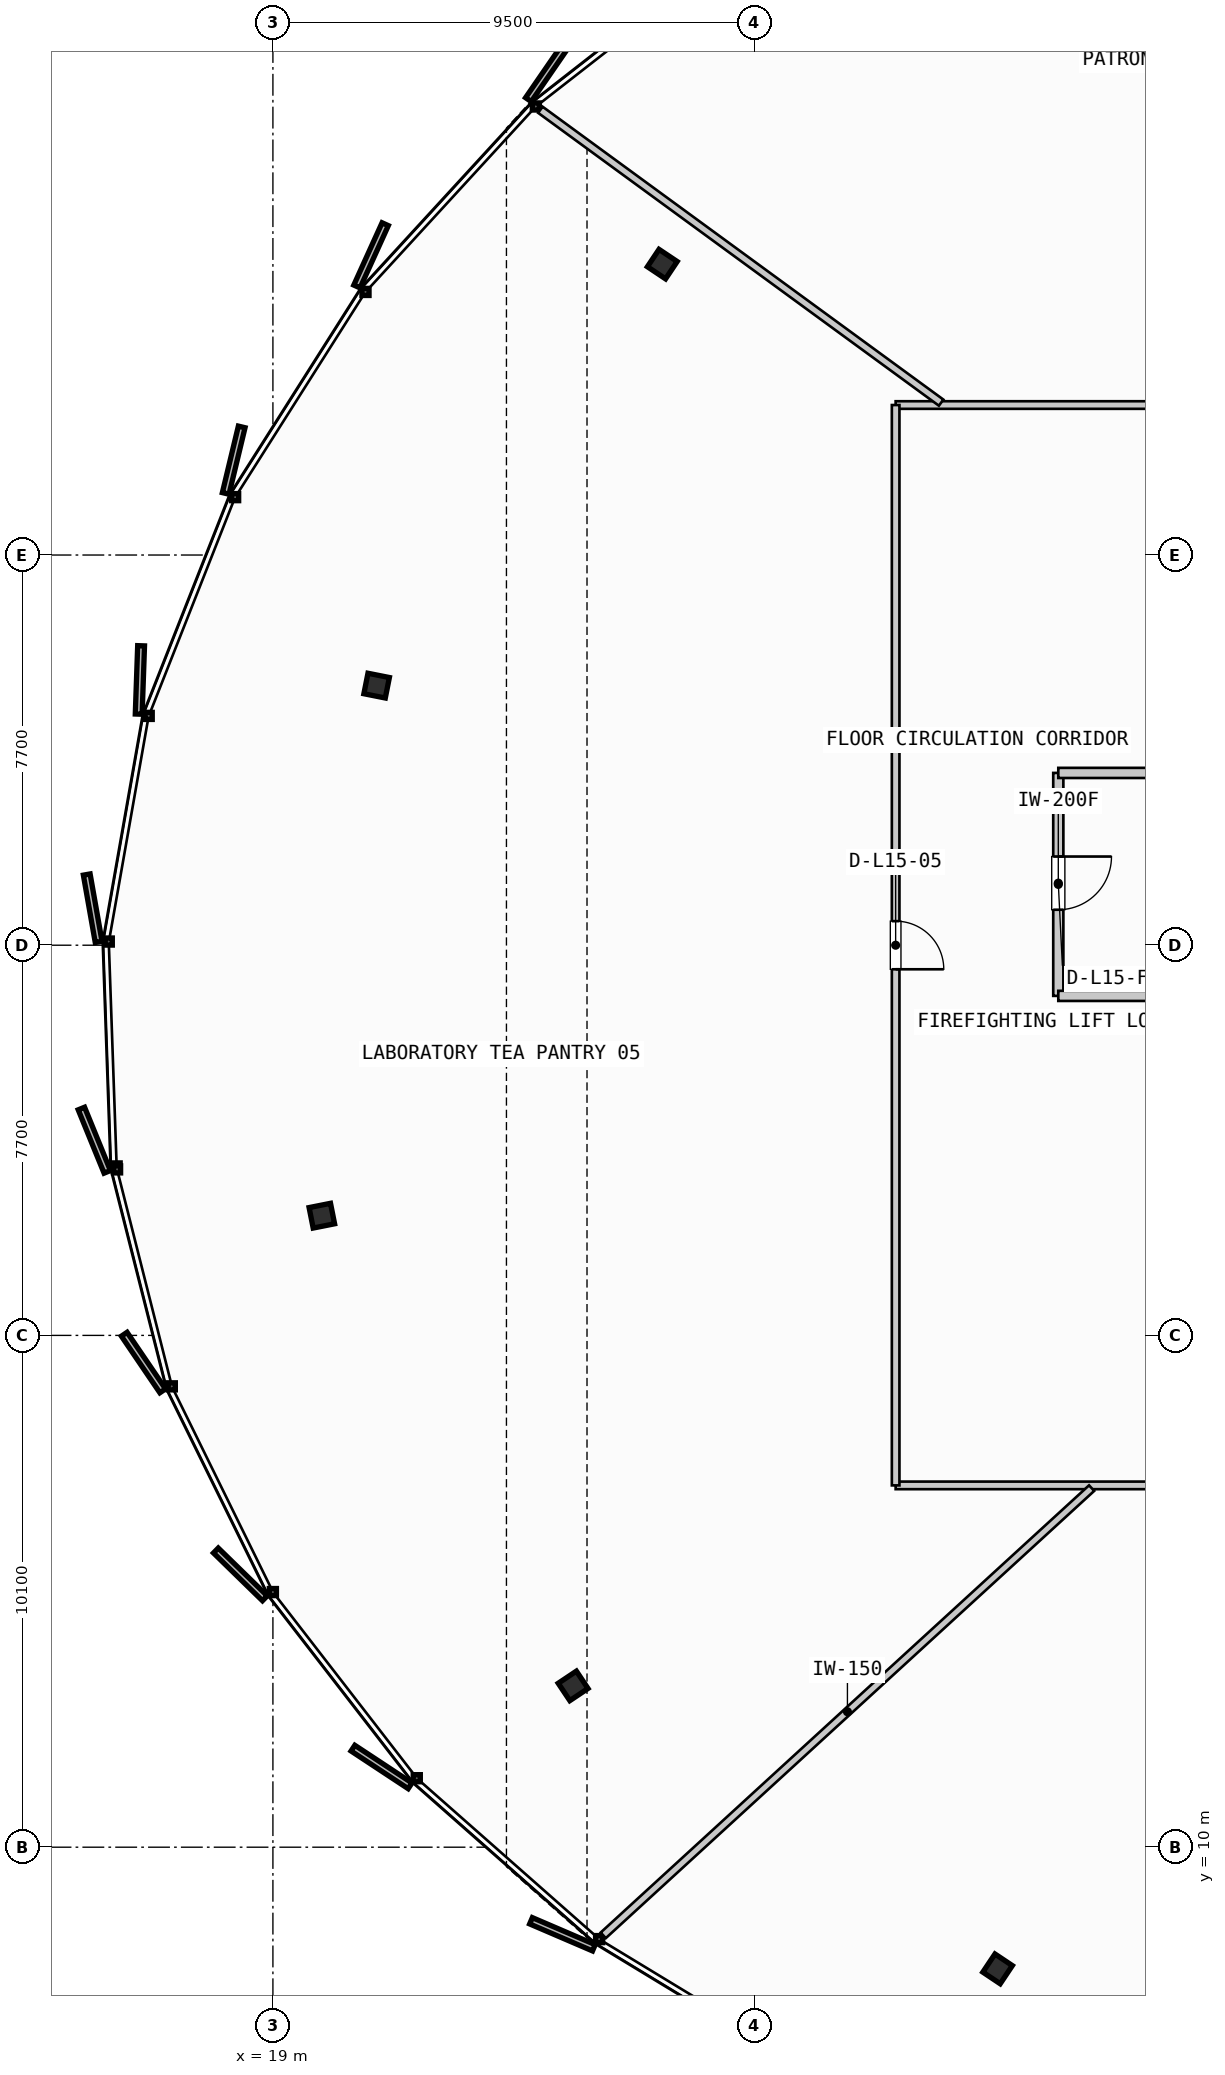
"""IFC4 building model, lengths in metres.
Left out: names, types, materials, properties, quantities, classifications, styles, units other than length and angle.
Written with IfcOpenShell. Run it as: python <this file> out.ifc"""

import sys

from ifc_helpers import new_model, si_unit, direction, frame, frame_2d, origin, origin_2d, place, context, subcontext, project, spatial, rectangle, i_section, extrude, source, transform, mapped, element, fill, save


model = new_model("IFC4")
c1 = context("Model", 3, precision=1e-05, world=origin(), true_north=direction((0.0, 1.0)))
c2 = subcontext(c1, "Body", "Model", "MODEL_VIEW")
j1 = project(units=[si_unit("LENGTHUNIT", "METRE"), si_unit("PLANEANGLEUNIT", "RADIAN")], contexts=[c1])
p1 = place(None, origin())
s1 = spatial("IfcSite", under=j1, at=p1, CompositionType="ELEMENT")
p2 = place(p1, origin())
s2 = spatial("IfcBuilding", under=s1, at=p2, CompositionType="ELEMENT")
p3 = place(p2, frame((0.0, 0.0, 63.8)))
s3 = spatial("IfcBuildingStorey", under=s2, at=p3, CompositionType="ELEMENT", Elevation=63.8)
m1 = source(origin(), c2, "Body", "SweptSolid", [
    extrude(i_section(OverallWidth=0.412, OverallDepth=0.431, WebThickness=0.042, FlangeThickness=0.068, FilletRadius=0.015, at=origin_2d()), origin(), (0.0, 0.0, 1.0), 3.55),
])
for number, where, z_axis, x_axis in (
    (1, (26.685, 41.241, 0.0), (0.0, 0.0, 1.0), (-0.831, 0.556, 0.0)),
    (2, (21.047, 32.923, 0.0), (0.0, 0.0, 1.0), (-0.981, 0.195, 0.0)),
    (3, (19.966, 22.462, 0.0), (0.0, 0.0, 1.0), (-0.981, -0.195, 0.0)),
    (4, (24.925, 13.183, 0.0), (0.0, 0.0, 1.0), (-0.831, -0.556, 0.0)),
    (5, (33.302, 7.599, 0.0), (0.0, 0.0, 1.0), (-0.556, -0.831, 0.0)),
):
    element("IfcColumn", number, at=place(p3, frame(where, z_axis=z_axis, x_axis=x_axis)), inside=s3, PredefinedType="COLUMN", context=c2, shape_type="MappedRepresentation", body=[
        mapped(m1, transform((0.0, 0.0, 0.0), scale=1.0)),
    ])
p4 = place(p3, frame((34.5, 31.2, 0.0), z_axis=(0.0, 0.0, 1.0), x_axis=(0.0, -1.0, 0.0)))
e6 = element("IfcWall", 6, at=p4, inside=s3, PredefinedType="PARTITIONING", context=c2, shape_type="SweptSolid", body=[
    extrude(rectangle(XDim=4.4, YDim=0.2, at=frame_2d((2.2, 0.0))), origin(), (0.0, 0.0, 1.0), 2.505),
])
p5 = place(p4, frame((1.65, 0.0, 0.0)))
e7 = element("IfcOpeningElement", 7, at=p5, cuts=e6, PredefinedType="OPENING", context=c2, shape_type="SweptSolid", body=[
    extrude(rectangle(XDim=1.05, YDim=2.15, at=frame_2d((0.525, 1.075))), frame((0.0, 0.11, 0.0), z_axis=(0.0, -1.0, 0.0), x_axis=(1.0, 0.0, 0.0)), (0.0, 0.0, 1.0), 0.22),
])
for number, where, z_axis, x_axis in (
    (8, (34.5, 26.8, 0.0), (0.0, 0.0, 1.0), (1.0, 0.0, 0.0)),
    (9, (34.5, 31.2, 0.0), (0.0, 0.0, 1.0), (1.0, 0.0, 0.0)),
):
    element("IfcWall", number, at=place(p3, frame(where, z_axis=z_axis, x_axis=x_axis)), inside=s3, PredefinedType="PARTITIONING", context=c2, shape_type="SweptSolid", body=[
        extrude(rectangle(XDim=3.14, YDim=0.2, at=frame_2d((1.57, 0.0))), origin(), (0.0, 0.0, 1.0), 2.505),
    ])
p6 = place(p3, frame((31.29, 17.14, 0.0), z_axis=(0.0, 0.0, 1.0), x_axis=(1.0, 0.0, 0.0)))
e10 = element("IfcWall", 10, at=p6, inside=s3, PredefinedType="PARTITIONING", context=c2, shape_type="SweptSolid", body=[
    extrude(rectangle(XDim=29.46, YDim=0.15, at=frame_2d((14.73, 0.0))), origin(), (0.0, 0.0, 1.0), 2.505),
])
p7 = place(p6, frame((15.862, 0.0, 0.0)))
e11 = element("IfcOpeningElement", 11, at=p7, cuts=e10, PredefinedType="OPENING", context=c2, shape_type="SweptSolid", body=[
    extrude(rectangle(XDim=0.95, YDim=2.15, at=frame_2d((0.475, 1.075))), frame((0.0, 0.085, 0.0), z_axis=(0.0, -1.0, 0.0), x_axis=(1.0, 0.0, 0.0)), (0.0, 0.0, 1.0), 0.17),
])
p8 = place(p3, frame((60.75, 38.46, 0.0), z_axis=(0.0, 0.0, 1.0), x_axis=(-1.0, 0.0, 0.0)))
e12 = element("IfcWall", 12, at=p8, inside=s3, PredefinedType="PARTITIONING", context=c2, shape_type="SweptSolid", body=[
    extrude(rectangle(XDim=29.46, YDim=0.15, at=frame_2d((14.73, 0.0))), origin(), (0.0, 0.0, 1.0), 2.505),
])
p9 = place(p8, frame((6.863, 0.0, 0.0)))
e13 = element("IfcOpeningElement", 13, at=p9, cuts=e12, PredefinedType="OPENING", context=c2, shape_type="SweptSolid", body=[
    extrude(rectangle(XDim=0.95, YDim=2.15, at=frame_2d((0.475, 1.075))), frame((0.0, 0.085, 0.0), z_axis=(0.0, -1.0, 0.0), x_axis=(1.0, 0.0, 0.0)), (0.0, 0.0, 1.0), 0.17),
])
p10 = place(p8, frame((20.461, 0.0, 0.0)))
e14 = element("IfcOpeningElement", 14, at=p10, cuts=e12, PredefinedType="OPENING", context=c2, shape_type="SweptSolid", body=[
    extrude(rectangle(XDim=0.95, YDim=2.15, at=frame_2d((0.475, 1.075))), frame((0.0, 0.085, 0.0), z_axis=(0.0, -1.0, 0.0), x_axis=(1.0, 0.0, 0.0)), (0.0, 0.0, 1.0), 0.17),
])
p11 = place(p3, frame((31.29, 38.46, 0.0), z_axis=(0.0, 0.0, 1.0), x_axis=(0.0, -1.0, 0.0)))
e15 = element("IfcWall", 15, at=p11, inside=s3, PredefinedType="PARTITIONING", context=c2, shape_type="SweptSolid", body=[
    extrude(rectangle(XDim=21.32, YDim=0.15, at=frame_2d((10.66, 0.0))), origin(), (0.0, 0.0, 1.0), 2.505),
])
p12 = place(p11, frame((10.185, 0.0, 0.0)))
e16 = element("IfcOpeningElement", 16, at=p12, cuts=e15, PredefinedType="OPENING", context=c2, shape_type="SweptSolid", body=[
    extrude(rectangle(XDim=0.95, YDim=2.15, at=frame_2d((0.475, 1.075))), frame((0.0, 0.085, 0.0), z_axis=(0.0, -1.0, 0.0), x_axis=(1.0, 0.0, 0.0)), (0.0, 0.0, 1.0), 0.17),
])
p13 = place(p3, frame((35.158, 17.086, 0.0), z_axis=(0.0, 0.0, 1.0), x_axis=(-0.737527023473, -0.675317621306, 0.0)))
e17 = element("IfcWall", 17, at=p13, inside=s3, PredefinedType="PARTITIONING", context=c2, shape_type="SweptSolid", body=[
    extrude(rectangle(XDim=13.069, YDim=0.15, at=frame_2d((6.534, 0.0))), origin(), (0.0, 0.0, 1.0), 2.505),
])
p14 = place(p3, frame((32.188, 38.507, 0.0), z_axis=(0.0, 0.0, 1.0), x_axis=(-0.807411670148, 0.589988470149, 0.0)))
e18 = element("IfcWall", 18, at=p14, inside=s3, PredefinedType="PARTITIONING", context=c2, shape_type="SweptSolid", body=[
    extrude(rectangle(XDim=9.796, YDim=0.15, at=frame_2d((4.898, 0.0))), origin(), (0.0, 0.0, 1.0), 2.505),
])
m2 = source(origin(), c2, "Body", "SweptSolid", [
    extrude(rectangle(XDim=1.05, YDim=2.15, at=frame_2d((0.525, 1.075))), frame((0.0, 0.025, 0.0), z_axis=(0.0, -1.0, 0.0), x_axis=(1.0, 0.0, 0.0)), (0.0, 0.0, 1.0), 0.05),
])
p15 = place(p5, origin())
e19 = element("IfcDoor", 19, at=p15, inside=s3, OperationType="SINGLE_SWING_LEFT", PredefinedType="DOOR", context=c2, shape_type="MappedRepresentation", body=[
    mapped(m2, transform((0.0, 0.0, 0.0), scale=1.0)),
])
fill(e7, e19)
m3 = source(origin(), c2, "Body", "SweptSolid", [
    extrude(rectangle(XDim=0.95, YDim=2.15, at=frame_2d((0.475, 1.075))), frame((0.0, 0.025, 0.0), z_axis=(0.0, -1.0, 0.0), x_axis=(1.0, 0.0, 0.0)), (0.0, 0.0, 1.0), 0.05),
])
p16 = place(p12, origin())
e20 = element("IfcDoor", 20, at=p16, inside=s3, OperationType="SINGLE_SWING_RIGHT", PredefinedType="DOOR", context=c2, shape_type="MappedRepresentation", body=[
    mapped(m3, transform((0.0, 0.0, 0.0), scale=1.0)),
])
fill(e16, e20)
save(model, sys.argv[1])
